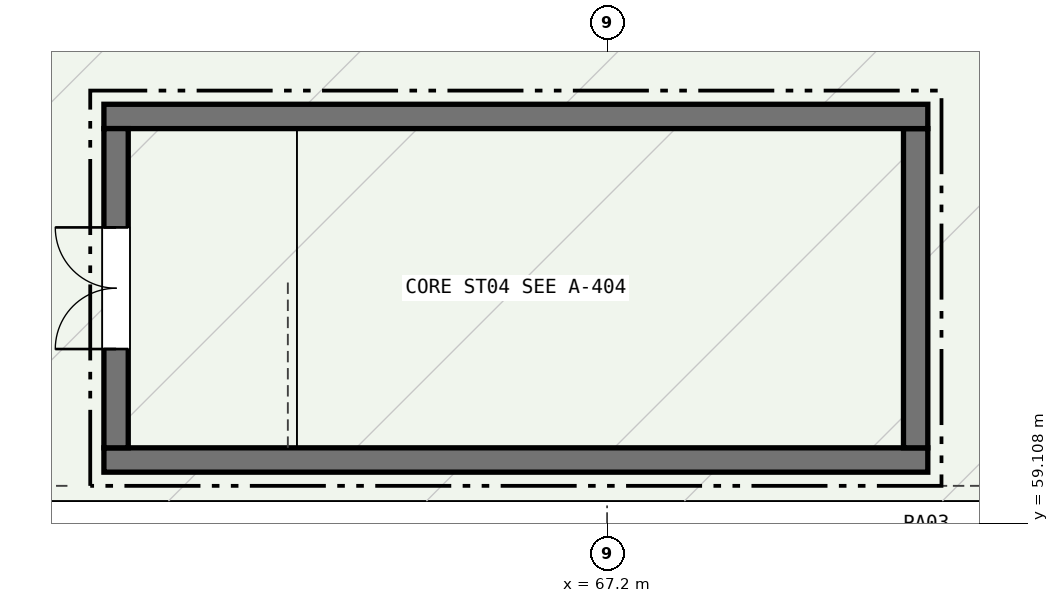
"""IFC4 building model, lengths in metres.
Left out: names, types, materials, properties, quantities, classifications, styles, units other than length and angle.
Written with IfcOpenShell. Run it as: python <this file> out.ifc"""

import sys

from ifc_helpers import new_model, si_unit, direction, frame, frame_2d, origin, place, context, subcontext, project, spatial, rectangle, extrude, element, fill, save


model = new_model("IFC4")
c1 = context("Model", 3, precision=1e-05, world=origin(), true_north=direction((0.0, 1.0)))
c2 = subcontext(c1, "Body", "Model", "MODEL_VIEW")
j1 = project(units=[si_unit("LENGTHUNIT", "METRE"), si_unit("PLANEANGLEUNIT", "RADIAN")], contexts=[c1])
p1 = place(None, origin())
s1 = spatial("IfcSite", under=j1, at=p1, CompositionType="ELEMENT")
p2 = place(p1, origin())
s2 = spatial("IfcBuilding", under=s1, at=p2, CompositionType="ELEMENT")
p3 = place(p2, frame((0.0, 0.0, 21.6)))
s3 = spatial("IfcBuildingStorey", under=s2, at=p3, CompositionType="ELEMENT", Elevation=21.6)
p4 = place(p3, frame((60.58, 59.94, 0.0), z_axis=(0.0, 0.0, 1.0), x_axis=(1.0, 0.0, 0.0)))
e1 = element("IfcWall", 1, at=p4, inside=s3, PredefinedType="SHEAR", context=c2, shape_type="SweptSolid", body=[
    extrude(rectangle(XDim=10.84, YDim=0.32, at=frame_2d((5.42, 0.0))), origin(), (0.0, 0.0, 1.0), 3.2),
])
p5 = place(p3, frame((71.26, 60.1, 0.0), z_axis=(0.0, 0.0, 1.0), x_axis=(0.0, 1.0, 0.0)))
e2 = element("IfcWall", 2, at=p5, inside=s3, PredefinedType="SHEAR", context=c2, shape_type="SweptSolid", body=[
    extrude(rectangle(XDim=4.2, YDim=0.32, at=frame_2d((2.1, 0.0))), origin(), (0.0, 0.0, 1.0), 3.2),
])
p6 = place(p3, frame((71.42, 64.46, 0.0), z_axis=(0.0, 0.0, 1.0), x_axis=(-1.0, 0.0, 0.0)))
e3 = element("IfcWall", 3, at=p6, inside=s3, PredefinedType="SHEAR", context=c2, shape_type="SweptSolid", body=[
    extrude(rectangle(XDim=10.84, YDim=0.32, at=frame_2d((5.42, 0.0))), origin(), (0.0, 0.0, 1.0), 3.2),
])
p7 = place(p3, frame((60.74, 64.3, 0.0), z_axis=(0.0, 0.0, 1.0), x_axis=(0.0, -1.0, 0.0)))
e4 = element("IfcWall", 4, at=p7, inside=s3, PredefinedType="SHEAR", context=c2, shape_type="SweptSolid", body=[
    extrude(rectangle(XDim=4.2, YDim=0.32, at=frame_2d((2.1, 0.0))), origin(), (0.0, 0.0, 1.0), 3.2),
])
p8 = place(p7, frame((1.3, 0.0, 0.0)))
e5 = element("IfcOpeningElement", 5, at=p8, cuts=e4, PredefinedType="OPENING", context=c2, shape_type="SweptSolid", body=[
    extrude(rectangle(XDim=1.6, YDim=2.2, at=frame_2d((0.8, 1.1))), frame((0.0, 0.17, 0.0), z_axis=(0.0, -1.0, 0.0), x_axis=(1.0, 0.0, 0.0)), (0.0, 0.0, 1.0), 0.34),
])
p9 = place(p8, frame((1.6, 0.0, 0.0), z_axis=(0.0, 0.0, 1.0), x_axis=(-1.0, 0.0, 0.0)))
e6 = element("IfcDoor", 6, at=p9, inside=s3, OperationType="DOUBLE_DOOR_SINGLE_SWING", PredefinedType="DOOR", context=c2, shape_type="SweptSolid", body=[
    extrude(rectangle(XDim=1.6, YDim=2.2, at=frame_2d((0.8, 1.1))), frame((0.0, 0.025, 0.0), z_axis=(0.0, -1.0, 0.0), x_axis=(1.0, 0.0, 0.0)), (0.0, 0.0, 1.0), 0.05),
])
fill(e5, e6)
save(model, sys.argv[1])
